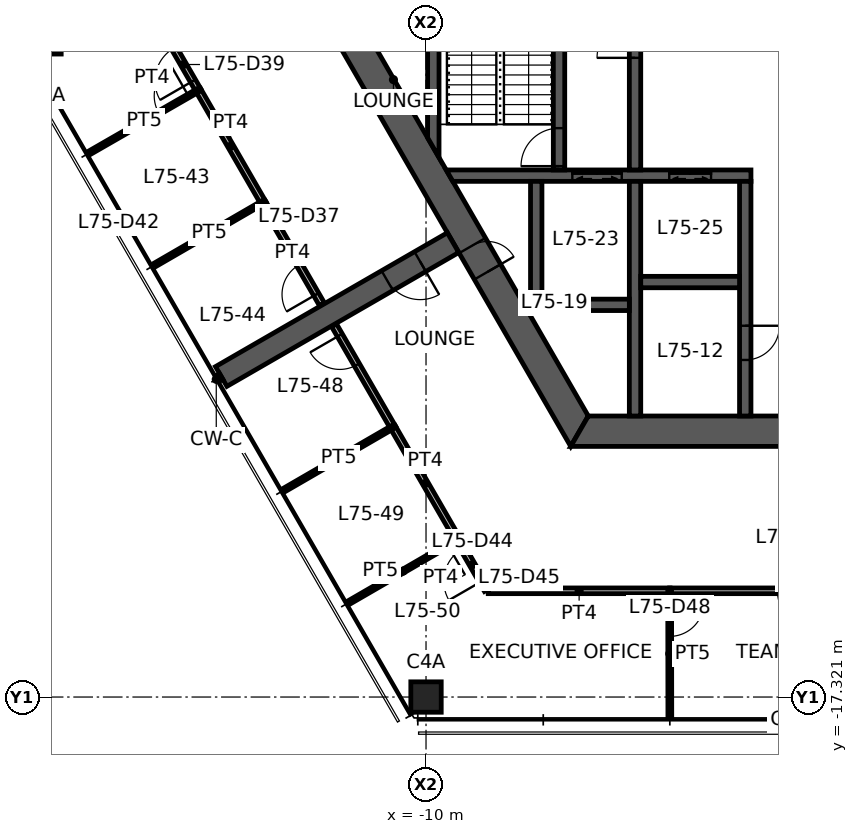
"""IFC4 building model, lengths in metres.
Left out: names, types, materials, properties, quantities, classifications, styles, units other than length and angle.
Written with IfcOpenShell. Run it as: python <this file> out.ifc"""

import sys

from ifc_helpers import new_model, si_unit, direction, frame, frame_2d, origin, origin_2d, place, context, subcontext, project, spatial, polyline, rectangle, hollow_rectangle, outline, extrude, element, fill, save


model = new_model("IFC4")
c1 = context("Model", 3, precision=1e-05, world=origin(), true_north=direction((0.0, 1.0)))
c2 = subcontext(c1, "Body", "Model", "MODEL_VIEW")
j1 = project(units=[si_unit("LENGTHUNIT", "METRE"), si_unit("PLANEANGLEUNIT", "RADIAN")], contexts=[c1])
p1 = place(None, origin())
s1 = spatial("IfcSite", under=j1, at=p1, CompositionType="ELEMENT")
p2 = place(p1, origin())
s2 = spatial("IfcBuilding", under=s1, at=p2, CompositionType="ELEMENT")
p3 = place(p2, frame((0.0, 0.0, 298.6)))
s3 = spatial("IfcBuildingStorey", under=s2, at=p3, CompositionType="ELEMENT", Elevation=298.6)
for number, where, z_axis, x_axis in (
    (1, (-20.0, 0.0, 0.0), (0.0, 0.0, 1.0), (1.0, 0.0, 0.0)),
    (2, (-10.0, -17.321, 0.0), (0.0, 0.0, 1.0), (1.0, 0.0, 0.0)),
):
    element("IfcColumn", number, at=place(p3, frame(where, z_axis=z_axis, x_axis=x_axis)), inside=s3, PredefinedType="COLUMN", context=c2, shape_type="SweptSolid", body=[
        extrude(hollow_rectangle(XDim=0.8, YDim=0.8, WallThickness=0.04, at=origin_2d()), origin(), (0.0, 0.0, 1.0), 3.9),
    ])
p4 = place(p3, frame((-11.922, 0.0, 0.0), z_axis=(0.0, 0.0, 1.0), x_axis=(0.500004296715, -0.866022923061, 0.0)))
e3 = element("IfcWall", 3, at=p4, inside=s3, PredefinedType="SHEAR", context=c2, shape_type="SweptSolid", body=[
    extrude(outline(polyline([(-0.231, -0.4), (6.281, -0.4), (7.081, -0.4), (12.153, -0.4), (11.691, 0.4), (7.081, 0.4), (6.281, 0.4), (0.231, 0.4), (-0.231, -0.4)])), origin(), (0.0, 0.0, 1.0), 3.9),
])
p5 = place(p4, frame((6.281, 0.0, 0.0)))
e4 = element("IfcOpeningElement", 4, at=p5, cuts=e3, PredefinedType="OPENING", context=c2, shape_type="SweptSolid", body=[
    extrude(rectangle(XDim=0.8, YDim=2.1, at=frame_2d((0.4, 1.05))), frame((0.0, 0.41, 0.0), z_axis=(0.0, -1.0, 0.0), x_axis=(1.0, 0.0, 0.0)), (0.0, 0.0, 1.0), 0.82),
])
p6 = place(p3, frame((-5.961, -10.325, 0.0), z_axis=(0.0, 0.0, 1.0), x_axis=(1.0, 0.0, 0.0)))
e5 = element("IfcWall", 5, at=p6, inside=s3, PredefinedType="SHEAR", context=c2, shape_type="SweptSolid", body=[
    extrude(outline(polyline([(-0.231, -0.4), (5.461, -0.4), (6.461, -0.4), (12.153, -0.4), (11.691, 0.4), (6.461, 0.4), (5.461, 0.4), (0.231, 0.4), (-0.231, -0.4)])), origin(), (0.0, 0.0, 1.0), 3.9),
])
p7 = place(p6, frame((5.461, 0.0, 0.0)))
e6 = element("IfcOpeningElement", 6, at=p7, cuts=e5, PredefinedType="OPENING", context=c2, shape_type="SweptSolid", body=[
    extrude(rectangle(XDim=1.0, YDim=2.1, at=frame_2d((0.5, 1.05))), frame((0.0, 0.41, 0.0), z_axis=(0.0, -1.0, 0.0), x_axis=(1.0, 0.0, 0.0)), (0.0, 0.0, 1.0), 0.82),
])
p8 = place(p3, frame((-9.288, -5.363, 0.0), z_axis=(0.0, 0.0, 1.0), x_axis=(-0.866027473358, -0.499996415376, 0.0)))
e7 = element("IfcWall", 7, at=p8, inside=s3, PredefinedType="SHEAR", context=c2, shape_type="SweptSolid", body=[
    extrude(rectangle(XDim=7.045, YDim=0.6, at=frame_2d((3.523, 0.0))), origin(), (0.0, 0.0, 1.0), 3.9),
])
p9 = place(p8, frame((1.0, 0.0, 0.0)))
e8 = element("IfcOpeningElement", 8, at=p9, cuts=e7, PredefinedType="OPENING", context=c2, shape_type="SweptSolid", body=[
    extrude(rectangle(XDim=1.0, YDim=2.1, at=frame_2d((0.5, 1.05))), frame((0.0, 0.31, 0.0), z_axis=(0.0, -1.0, 0.0), x_axis=(1.0, 0.0, 0.0)), (0.0, 0.0, 1.0), 0.62),
])
p10 = place(p3, frame((-9.382, -3.6, 0.0), z_axis=(0.0, 0.0, 1.0), x_axis=(1.0, 0.0, 0.0)))
e9 = element("IfcWall", 9, at=p10, inside=s3, PredefinedType="SHEAR", context=c2, shape_type="SweptSolid", body=[
    extrude(outline(polyline([(0.087, -0.15), (3.232, -0.15), (4.532, -0.15), (5.782, -0.15), (6.882, -0.15), (7.932, -0.15), (7.932, 0.15), (6.882, 0.15), (5.782, 0.15), (4.532, 0.15), (3.232, 0.15), (-0.087, 0.15), (0.087, -0.15)])), origin(), (0.0, 0.0, 1.0), 3.9),
])
p11 = place(p10, frame((5.782, 0.0, 0.0)))
e10 = element("IfcOpeningElement", 10, at=p11, cuts=e9, PredefinedType="OPENING", context=c2, shape_type="SweptSolid", body=[
    extrude(rectangle(XDim=1.1, YDim=2.1, at=frame_2d((0.55, 1.05))), frame((0.0, 0.16, 0.0), z_axis=(0.0, -1.0, 0.0), x_axis=(1.0, 0.0, 0.0)), (0.0, 0.0, 1.0), 0.32),
])
p12 = place(p10, frame((3.232, 0.0, 0.0)))
e11 = element("IfcOpeningElement", 11, at=p12, cuts=e9, PredefinedType="OPENING", context=c2, shape_type="SweptSolid", body=[
    extrude(rectangle(XDim=1.3, YDim=2.1, at=frame_2d((0.65, 1.05))), frame((0.0, 0.16, 0.0), z_axis=(0.0, -1.0, 0.0), x_axis=(1.0, 0.0, 0.0)), (0.0, 0.0, 1.0), 0.32),
])
p13 = place(p3, frame((-1.6, -3.75, 0.0), z_axis=(0.0, 0.0, 1.0), x_axis=(0.0, -1.0, 0.0)))
e12 = element("IfcWall", 12, at=p13, inside=s3, PredefinedType="SHEAR", context=c2, shape_type="SweptSolid", body=[
    extrude(rectangle(XDim=6.175, YDim=0.3, at=frame_2d((3.087, 0.0))), origin(), (0.0, 0.0, 1.0), 3.9),
])
p14 = place(p13, frame((3.8, 0.0, 0.0)))
e13 = element("IfcOpeningElement", 13, at=p14, cuts=e12, PredefinedType="OPENING", context=c2, shape_type="SweptSolid", body=[
    extrude(rectangle(XDim=0.9, YDim=2.1, at=frame_2d((0.45, 1.05))), frame((0.0, 0.16, 0.0), z_axis=(0.0, -1.0, 0.0), x_axis=(1.0, 0.0, 0.0)), (0.0, 0.0, 1.0), 0.32),
])
p15 = place(p3, frame((-4.5, -3.45, 0.0), z_axis=(0.0, 0.0, 1.0), x_axis=(0.0, 1.0, 0.0)))
e14 = element("IfcWall", 14, at=p15, inside=s3, PredefinedType="SHEAR", context=c2, shape_type="SweptSolid", body=[
    extrude(rectangle(XDim=6.9, YDim=0.3, at=frame_2d((3.45, 0.0))), origin(), (0.0, 0.0, 1.0), 3.9),
])
p16 = place(p15, frame((2.95, 0.0, 0.0)))
e15 = element("IfcOpeningElement", 15, at=p16, cuts=e14, PredefinedType="OPENING", context=c2, shape_type="SweptSolid", body=[
    extrude(rectangle(XDim=1.0, YDim=2.1, at=frame_2d((0.5, 1.05))), frame((0.0, 0.16, 0.0), z_axis=(0.0, -1.0, 0.0), x_axis=(1.0, 0.0, 0.0)), (0.0, 0.0, 1.0), 0.32),
])
p17 = place(p3, frame((-6.5, -3.45, 0.0), z_axis=(0.0, 0.0, 1.0), x_axis=(0.0, 1.0, 0.0)))
e16 = element("IfcWall", 16, at=p17, inside=s3, PredefinedType="SHEAR", context=c2, shape_type="SweptSolid", body=[
    extrude(rectangle(XDim=6.9, YDim=0.3, at=frame_2d((3.45, 0.0))), origin(), (0.0, 0.0, 1.0), 3.9),
])
p18 = place(p17, frame((0.1, 0.0, 0.0)))
e17 = element("IfcOpeningElement", 17, at=p18, cuts=e16, PredefinedType="OPENING", context=c2, shape_type="SweptSolid", body=[
    extrude(rectangle(XDim=1.0, YDim=2.1, at=frame_2d((0.5, 1.05))), frame((0.0, 0.16, 0.0), z_axis=(0.0, -1.0, 0.0), x_axis=(1.0, 0.0, 0.0)), (0.0, 0.0, 1.0), 0.32),
])
p19 = place(p3, frame((-4.5, -3.75, 0.0), z_axis=(0.0, 0.0, 1.0), x_axis=(0.0, -1.0, 0.0)))
e18 = element("IfcWall", 18, at=p19, inside=s3, PredefinedType="SHEAR", context=c2, shape_type="SweptSolid", body=[
    extrude(rectangle(XDim=6.175, YDim=0.3, at=frame_2d((3.087, 0.0))), origin(), (0.0, 0.0, 1.0), 3.9),
])
for number, where, z_axis, x_axis in (
    (19, (-4.35, -6.4, 0.0), (0.0, 0.0, 1.0), (1.0, 0.0, 0.0)),
    (20, (-7.25, -7.0, 0.0), (0.0, 0.0, 1.0), (1.0, 0.0, 0.0)),
):
    element("IfcWall", number, at=place(p3, frame(where, z_axis=z_axis, x_axis=x_axis)), inside=s3, PredefinedType="SHEAR", context=c2, shape_type="SweptSolid", body=[
        extrude(rectangle(XDim=2.6, YDim=0.3, at=frame_2d((1.3, 0.0))), origin(), (0.0, 0.0, 1.0), 3.9),
    ])
p20 = place(p3, frame((-7.1, -3.75, 0.0), z_axis=(0.0, 0.0, 1.0), x_axis=(0.0, -1.0, 0.0)))
e21 = element("IfcWall", 21, at=p20, inside=s3, PredefinedType="SHEAR", context=c2, shape_type="SweptSolid", body=[
    extrude(rectangle(XDim=3.1, YDim=0.3, at=frame_2d((1.55, 0.0))), origin(), (0.0, 0.0, 1.0), 3.9),
])
p21 = place(p3, frame((-9.808, -2.862, 0.0), z_axis=(0.0, 0.0, 1.0), x_axis=(0.0, 1.0, 0.0)))
e22 = element("IfcWall", 22, at=p21, inside=s3, PredefinedType="SHEAR", context=c2, shape_type="SweptSolid", body=[
    extrude(outline(polyline([(-0.26, -0.15), (5.984, -0.15), (5.465, 0.15), (0.26, 0.15), (-0.26, -0.15)])), origin(), (0.0, 0.0, 1.0), 3.9),
])
p22 = place(p3, frame((-14.284, -4.309, 0.0), z_axis=(0.0, 0.0, 1.0), x_axis=(-0.500032973541, 0.866006365664, 0.0)))
e23 = element("IfcWall", 23, at=p22, inside=s3, PredefinedType="PARTITIONING", context=c2, shape_type="SweptSolid", body=[
    extrude(rectangle(XDim=3.426, YDim=0.15, at=frame_2d((1.713, 0.0))), origin(), (0.0, 0.0, 1.0), 2.35),
])
p23 = place(p3, frame((-12.739, -6.985, 0.0), z_axis=(0.0, 0.0, 1.0), x_axis=(-0.500017819788, 0.86601511528, 0.0)))
e24 = element("IfcWall", 24, at=p23, inside=s3, PredefinedType="PARTITIONING", context=c2, shape_type="SweptSolid", body=[
    extrude(rectangle(XDim=3.101, YDim=0.15, at=frame_2d((1.55, 0.0))), origin(), (0.0, 0.0, 1.0), 2.35),
])
p24 = place(p23, frame((0.3, 0.0, 0.0)))
e25 = element("IfcOpeningElement", 25, at=p24, cuts=e24, PredefinedType="OPENING", context=c2, shape_type="SweptSolid", body=[
    extrude(rectangle(XDim=0.9, YDim=2.1, at=frame_2d((0.45, 1.05))), frame((0.0, 0.085, 0.0), z_axis=(0.0, -1.0, 0.0), x_axis=(1.0, 0.0, 0.0)), (0.0, 0.0, 1.0), 0.17),
])
p25 = place(p3, frame((-15.992, -1.351, 0.0), z_axis=(0.0, 0.0, 1.0), x_axis=(-0.500011542666, 0.866018739521, 0.0)))
e26 = element("IfcWall", 26, at=p25, inside=s3, PredefinedType="PARTITIONING", context=c2, shape_type="SweptSolid", body=[
    extrude(rectangle(XDim=1.56, YDim=0.15, at=frame_2d((0.78, 0.0))), origin(), (0.0, 0.0, 1.0), 2.35),
])
p26 = place(p25, frame((0.28, 0.0, 0.0)))
e27 = element("IfcOpeningElement", 27, at=p26, cuts=e26, PredefinedType="OPENING", context=c2, shape_type="SweptSolid", body=[
    extrude(rectangle(XDim=1.0, YDim=2.1, at=frame_2d((0.5, 1.05))), frame((0.0, 0.085, 0.0), z_axis=(0.0, -1.0, 0.0), x_axis=(1.0, 0.0, 0.0)), (0.0, 0.0, 1.0), 0.17),
])
p27 = place(p3, frame((-14.289, -4.3, 0.0), z_axis=(0.0, 0.0, 1.0), x_axis=(-0.865245913684, -0.501347692578, 0.0)))
e28 = element("IfcWall", 28, at=p27, inside=s3, PredefinedType="PARTITIONING", context=c2, shape_type="SweptSolid", body=[
    extrude(rectangle(XDim=3.275, YDim=0.1, at=frame_2d((1.638, 0.0))), origin(), (0.0, 0.0, 1.0), 2.35),
])
p28 = place(p3, frame((-18.84, -2.99, 0.0), z_axis=(0.0, 0.0, 1.0), x_axis=(0.866707153418, 0.498817311462, 0.0)))
e29 = element("IfcWall", 29, at=p28, inside=s3, PredefinedType="PARTITIONING", context=c2, shape_type="SweptSolid", body=[
    extrude(rectangle(XDim=3.286, YDim=0.1, at=frame_2d((1.643, 0.0))), origin(), (0.0, 0.0, 1.0), 2.35),
])
p29 = place(p28, frame((2.086, 0.0, 0.0)))
e30 = element("IfcOpeningElement", 30, at=p29, cuts=e29, PredefinedType="OPENING", context=c2, shape_type="SweptSolid", body=[
    extrude(rectangle(XDim=0.9, YDim=2.1, at=frame_2d((0.45, 1.05))), frame((0.0, 0.06, 0.0), z_axis=(0.0, -1.0, 0.0), x_axis=(1.0, 0.0, 0.0)), (0.0, 0.0, 1.0), 0.12),
])
p30 = place(p3, frame((-10.869, -10.225, 0.0), z_axis=(0.0, 0.0, 1.0), x_axis=(-0.499958760481, 0.866049212123, 0.0)))
e31 = element("IfcWall", 31, at=p30, inside=s3, PredefinedType="PARTITIONING", context=c2, shape_type="SweptSolid", body=[
    extrude(rectangle(XDim=3.1, YDim=0.15, at=frame_2d((1.55, 0.0))), origin(), (0.0, 0.0, 1.0), 2.35),
])
p31 = place(p30, frame((1.9, 0.0, 0.0)))
e32 = element("IfcOpeningElement", 32, at=p31, cuts=e31, PredefinedType="OPENING", context=c2, shape_type="SweptSolid", body=[
    extrude(rectangle(XDim=0.9, YDim=2.1, at=frame_2d((0.45, 1.05))), frame((0.0, 0.085, 0.0), z_axis=(0.0, -1.0, 0.0), x_axis=(1.0, 0.0, 0.0)), (0.0, 0.0, 1.0), 0.17),
])
p32 = place(p3, frame((-9.161, -13.183, 0.0), z_axis=(0.0, 0.0, 1.0), x_axis=(-0.500032973541, 0.866006365664, 0.0)))
e33 = element("IfcWall", 33, at=p32, inside=s3, PredefinedType="PARTITIONING", context=c2, shape_type="SweptSolid", body=[
    extrude(rectangle(XDim=3.426, YDim=0.15, at=frame_2d((1.713, 0.0))), origin(), (0.0, 0.0, 1.0), 2.35),
])
p33 = place(p3, frame((-8.398, -14.505, 0.0), z_axis=(0.0, 0.0, 1.0), x_axis=(-0.499933379091, 0.866063863968, 0.0)))
e34 = element("IfcWall", 34, at=p33, inside=s3, PredefinedType="PARTITIONING", context=c2, shape_type="SweptSolid", body=[
    extrude(rectangle(XDim=1.536, YDim=0.15, at=frame_2d((0.768, 0.0))), origin(), (0.0, 0.0, 1.0), 2.35),
])
p34 = place(p33, frame((0.268, 0.0, 0.0)))
e35 = element("IfcOpeningElement", 35, at=p34, cuts=e34, PredefinedType="OPENING", context=c2, shape_type="SweptSolid", body=[
    extrude(rectangle(XDim=1.0, YDim=2.1, at=frame_2d((0.5, 1.05))), frame((0.0, 0.085, 0.0), z_axis=(0.0, -1.0, 0.0), x_axis=(1.0, 0.0, 0.0)), (0.0, 0.0, 1.0), 0.17),
])
p35 = place(p3, frame((-10.874, -10.216, 0.0), z_axis=(0.0, 0.0, 1.0), x_axis=(-0.865292288087, -0.501267649243, 0.0)))
e36 = element("IfcWall", 36, at=p35, inside=s3, PredefinedType="PARTITIONING", context=c2, shape_type="SweptSolid", body=[
    extrude(rectangle(XDim=3.286, YDim=0.1, at=frame_2d((1.643, 0.0))), origin(), (0.0, 0.0, 1.0), 2.35),
])
p36 = place(p3, frame((-9.166, -13.174, 0.0), z_axis=(0.0, 0.0, 1.0), x_axis=(-0.865342122637, -0.501181614577, 0.0)))
e37 = element("IfcWall", 37, at=p36, inside=s3, PredefinedType="PARTITIONING", context=c2, shape_type="SweptSolid", body=[
    extrude(rectangle(XDim=3.311, YDim=0.1, at=frame_2d((1.655, 0.0))), origin(), (0.0, 0.0, 1.0), 2.35),
])
p37 = place(p36, frame((0.3, 0.0, 0.0)))
e38 = element("IfcOpeningElement", 38, at=p37, cuts=e37, PredefinedType="OPENING", context=c2, shape_type="SweptSolid", body=[
    extrude(rectangle(XDim=0.9, YDim=2.1, at=frame_2d((0.45, 1.05))), frame((0.0, 0.06, 0.0), z_axis=(0.0, -1.0, 0.0), x_axis=(1.0, 0.0, 0.0)), (0.0, 0.0, 1.0), 0.12),
])
p38 = place(p3, frame((-3.58, -14.525, 0.0), z_axis=(0.0, 0.0, 1.0), x_axis=(-1.0, 0.0, 0.0)))
e39 = element("IfcWall", 39, at=p38, inside=s3, PredefinedType="PARTITIONING", context=c2, shape_type="SweptSolid", body=[
    extrude(rectangle(XDim=4.783, YDim=0.15, at=frame_2d((2.392, 0.0))), origin(), (0.0, 0.0, 1.0), 2.35),
])
p39 = place(p3, frame((3.082, -14.525, 0.0), z_axis=(0.0, 0.0, 1.0), x_axis=(-1.0, 0.0, 0.0)))
e40 = element("IfcWall", 40, at=p39, inside=s3, PredefinedType="PARTITIONING", context=c2, shape_type="SweptSolid", body=[
    extrude(rectangle(XDim=6.671, YDim=0.15, at=frame_2d((3.335, 0.0))), origin(), (0.0, 0.0, 1.0), 2.35),
])
p40 = place(p39, frame((2.835, 0.0, 0.0)))
e41 = element("IfcOpeningElement", 41, at=p40, cuts=e40, PredefinedType="OPENING", context=c2, shape_type="SweptSolid", body=[
    extrude(rectangle(XDim=1.0, YDim=2.1, at=frame_2d((0.5, 1.05))), frame((0.0, 0.085, 0.0), z_axis=(0.0, -1.0, 0.0), x_axis=(1.0, 0.0, 0.0)), (0.0, 0.0, 1.0), 0.17),
])
p41 = place(p3, frame((-3.589, -14.525, 0.0), z_axis=(0.0, 0.0, 1.0), x_axis=(0.001401178566, -0.999999018349, 0.0)))
e42 = element("IfcWall", 42, at=p41, inside=s3, PredefinedType="PARTITIONING", context=c2, shape_type="SweptSolid", body=[
    extrude(rectangle(XDim=3.311, YDim=0.1, at=frame_2d((1.655, 0.0))), origin(), (0.0, 0.0, 1.0), 2.35),
])
p42 = place(p41, frame((0.3, 0.0, 0.0)))
e43 = element("IfcOpeningElement", 43, at=p42, cuts=e42, PredefinedType="OPENING", context=c2, shape_type="SweptSolid", body=[
    extrude(rectangle(XDim=0.9, YDim=2.1, at=frame_2d((0.45, 1.05))), frame((0.0, 0.06, 0.0), z_axis=(0.0, -1.0, 0.0), x_axis=(1.0, 0.0, 0.0)), (0.0, 0.0, 1.0), 0.12),
])
p43 = place(p3, frame((-15.39, -8.885, 0.0), z_axis=(0.0, 0.0, 1.0), x_axis=(-0.866622456874, -0.498964444867, 0.0)))
e44 = element("IfcWall", 44, at=p43, inside=s3, PredefinedType="PARTITIONING", context=c2, shape_type="SweptSolid", body=[
    extrude(rectangle(XDim=0.065, YDim=0.175, at=frame_2d((0.033, 0.0))), origin(), (0.0, 0.0, 1.0), 3.9),
])
p44 = place(p5, origin())
e45 = element("IfcDoor", 45, at=p44, inside=s3, OperationType="SINGLE_SWING_RIGHT", PredefinedType="DOOR", context=c2, shape_type="SweptSolid", body=[
    extrude(rectangle(XDim=0.8, YDim=2.1, at=frame_2d((0.4, 1.05))), frame((0.0, 0.025, 0.0), z_axis=(0.0, -1.0, 0.0), x_axis=(1.0, 0.0, 0.0)), (0.0, 0.0, 1.0), 0.05),
])
fill(e4, e45)
p45 = place(p16, origin())
e46 = element("IfcDoor", 46, at=p45, inside=s3, OperationType="SINGLE_SWING_LEFT", PredefinedType="DOOR", context=c2, shape_type="SweptSolid", body=[
    extrude(rectangle(XDim=1.0, YDim=2.1, at=frame_2d((0.5, 1.05))), frame((0.0, 0.025, 0.0), z_axis=(0.0, -1.0, 0.0), x_axis=(1.0, 0.0, 0.0)), (0.0, 0.0, 1.0), 0.05),
])
fill(e15, e46)
p46 = place(p18, origin())
e47 = element("IfcDoor", 47, at=p46, inside=s3, OperationType="SINGLE_SWING_LEFT", PredefinedType="DOOR", context=c2, shape_type="SweptSolid", body=[
    extrude(rectangle(XDim=1.0, YDim=2.1, at=frame_2d((0.5, 1.05))), frame((0.0, 0.025, 0.0), z_axis=(0.0, -1.0, 0.0), x_axis=(1.0, 0.0, 0.0)), (0.0, 0.0, 1.0), 0.05),
])
fill(e17, e47)
p47 = place(p14, origin())
e48 = element("IfcDoor", 48, at=p47, inside=s3, OperationType="SINGLE_SWING_LEFT", PredefinedType="DOOR", context=c2, shape_type="SweptSolid", body=[
    extrude(rectangle(XDim=0.9, YDim=2.1, at=frame_2d((0.45, 1.05))), frame((0.0, 0.025, 0.0), z_axis=(0.0, -1.0, 0.0), x_axis=(1.0, 0.0, 0.0)), (0.0, 0.0, 1.0), 0.05),
])
fill(e13, e48)
p48 = place(p9, origin())
e49 = element("IfcDoor", 49, at=p48, inside=s3, OperationType="SINGLE_SWING_LEFT", PredefinedType="DOOR", context=c2, shape_type="SweptSolid", body=[
    extrude(rectangle(XDim=1.0, YDim=2.1, at=frame_2d((0.5, 1.05))), frame((0.0, 0.025, 0.0), z_axis=(0.0, -1.0, 0.0), x_axis=(1.0, 0.0, 0.0)), (0.0, 0.0, 1.0), 0.05),
])
fill(e8, e49)
p49 = place(p24, origin())
e50 = element("IfcDoor", 50, at=p49, inside=s3, OperationType="SINGLE_SWING_LEFT", PredefinedType="DOOR", context=c2, shape_type="SweptSolid", body=[
    extrude(rectangle(XDim=0.9, YDim=2.1, at=frame_2d((0.45, 1.05))), frame((0.0, 0.025, 0.0), z_axis=(0.0, -1.0, 0.0), x_axis=(1.0, 0.0, 0.0)), (0.0, 0.0, 1.0), 0.05),
])
fill(e25, e50)
p50 = place(p26, origin())
e51 = element("IfcDoor", 51, at=p50, inside=s3, OperationType="SINGLE_SWING_LEFT", PredefinedType="DOOR", context=c2, shape_type="SweptSolid", body=[
    extrude(rectangle(XDim=1.0, YDim=2.1, at=frame_2d((0.5, 1.05))), frame((0.0, 0.025, 0.0), z_axis=(0.0, -1.0, 0.0), x_axis=(1.0, 0.0, 0.0)), (0.0, 0.0, 1.0), 0.05),
])
fill(e27, e51)
p51 = place(p29, origin())
e52 = element("IfcDoor", 52, at=p51, inside=s3, OperationType="SINGLE_SWING_RIGHT", PredefinedType="DOOR", context=c2, shape_type="SweptSolid", body=[
    extrude(rectangle(XDim=0.9, YDim=2.1, at=frame_2d((0.45, 1.05))), frame((0.0, 0.025, 0.0), z_axis=(0.0, -1.0, 0.0), x_axis=(1.0, 0.0, 0.0)), (0.0, 0.0, 1.0), 0.05),
])
fill(e30, e52)
p52 = place(p31, origin())
e53 = element("IfcDoor", 53, at=p52, inside=s3, OperationType="SINGLE_SWING_RIGHT", PredefinedType="DOOR", context=c2, shape_type="SweptSolid", body=[
    extrude(rectangle(XDim=0.9, YDim=2.1, at=frame_2d((0.45, 1.05))), frame((0.0, 0.025, 0.0), z_axis=(0.0, -1.0, 0.0), x_axis=(1.0, 0.0, 0.0)), (0.0, 0.0, 1.0), 0.05),
])
fill(e32, e53)
p53 = place(p34, origin())
e54 = element("IfcDoor", 54, at=p53, inside=s3, OperationType="SINGLE_SWING_LEFT", PredefinedType="DOOR", context=c2, shape_type="SweptSolid", body=[
    extrude(rectangle(XDim=1.0, YDim=2.1, at=frame_2d((0.5, 1.05))), frame((0.0, 0.025, 0.0), z_axis=(0.0, -1.0, 0.0), x_axis=(1.0, 0.0, 0.0)), (0.0, 0.0, 1.0), 0.05),
])
fill(e35, e54)
p54 = place(p37, origin())
e55 = element("IfcDoor", 55, at=p54, inside=s3, OperationType="SINGLE_SWING_LEFT", PredefinedType="DOOR", context=c2, shape_type="SweptSolid", body=[
    extrude(rectangle(XDim=0.9, YDim=2.1, at=frame_2d((0.45, 1.05))), frame((0.0, 0.025, 0.0), z_axis=(0.0, -1.0, 0.0), x_axis=(1.0, 0.0, 0.0)), (0.0, 0.0, 1.0), 0.05),
])
fill(e38, e55)
p55 = place(p40, origin())
e56 = element("IfcDoor", 56, at=p55, inside=s3, OperationType="SINGLE_SWING_LEFT", PredefinedType="DOOR", context=c2, shape_type="SweptSolid", body=[
    extrude(rectangle(XDim=1.0, YDim=2.1, at=frame_2d((0.5, 1.05))), frame((0.0, 0.025, 0.0), z_axis=(0.0, -1.0, 0.0), x_axis=(1.0, 0.0, 0.0)), (0.0, 0.0, 1.0), 0.05),
])
fill(e41, e56)
p56 = place(p42, origin())
e57 = element("IfcDoor", 57, at=p56, inside=s3, OperationType="SINGLE_SWING_LEFT", PredefinedType="DOOR", context=c2, shape_type="SweptSolid", body=[
    extrude(rectangle(XDim=0.9, YDim=2.1, at=frame_2d((0.45, 1.05))), frame((0.0, 0.025, 0.0), z_axis=(0.0, -1.0, 0.0), x_axis=(1.0, 0.0, 0.0)), (0.0, 0.0, 1.0), 0.05),
])
fill(e43, e57)
p57 = place(p11, origin())
e58 = element("IfcDoor", 58, at=p57, inside=s3, OperationType="DOUBLE_DOOR_SLIDING", PredefinedType="DOOR", context=c2, shape_type="SweptSolid", body=[
    extrude(rectangle(XDim=1.1, YDim=2.1, at=frame_2d((0.55, 1.05))), frame((0.0, 0.025, 0.0), z_axis=(0.0, -1.0, 0.0), x_axis=(1.0, 0.0, 0.0)), (0.0, 0.0, 1.0), 0.05),
])
fill(e10, e58)
p58 = place(p12, origin())
e59 = element("IfcDoor", 59, at=p58, inside=s3, OperationType="DOUBLE_DOOR_SLIDING", PredefinedType="DOOR", context=c2, shape_type="SweptSolid", body=[
    extrude(rectangle(XDim=1.3, YDim=2.1, at=frame_2d((0.65, 1.05))), frame((0.0, 0.025, 0.0), z_axis=(0.0, -1.0, 0.0), x_axis=(1.0, 0.0, 0.0)), (0.0, 0.0, 1.0), 0.05),
])
fill(e11, e59)
save(model, sys.argv[1])
